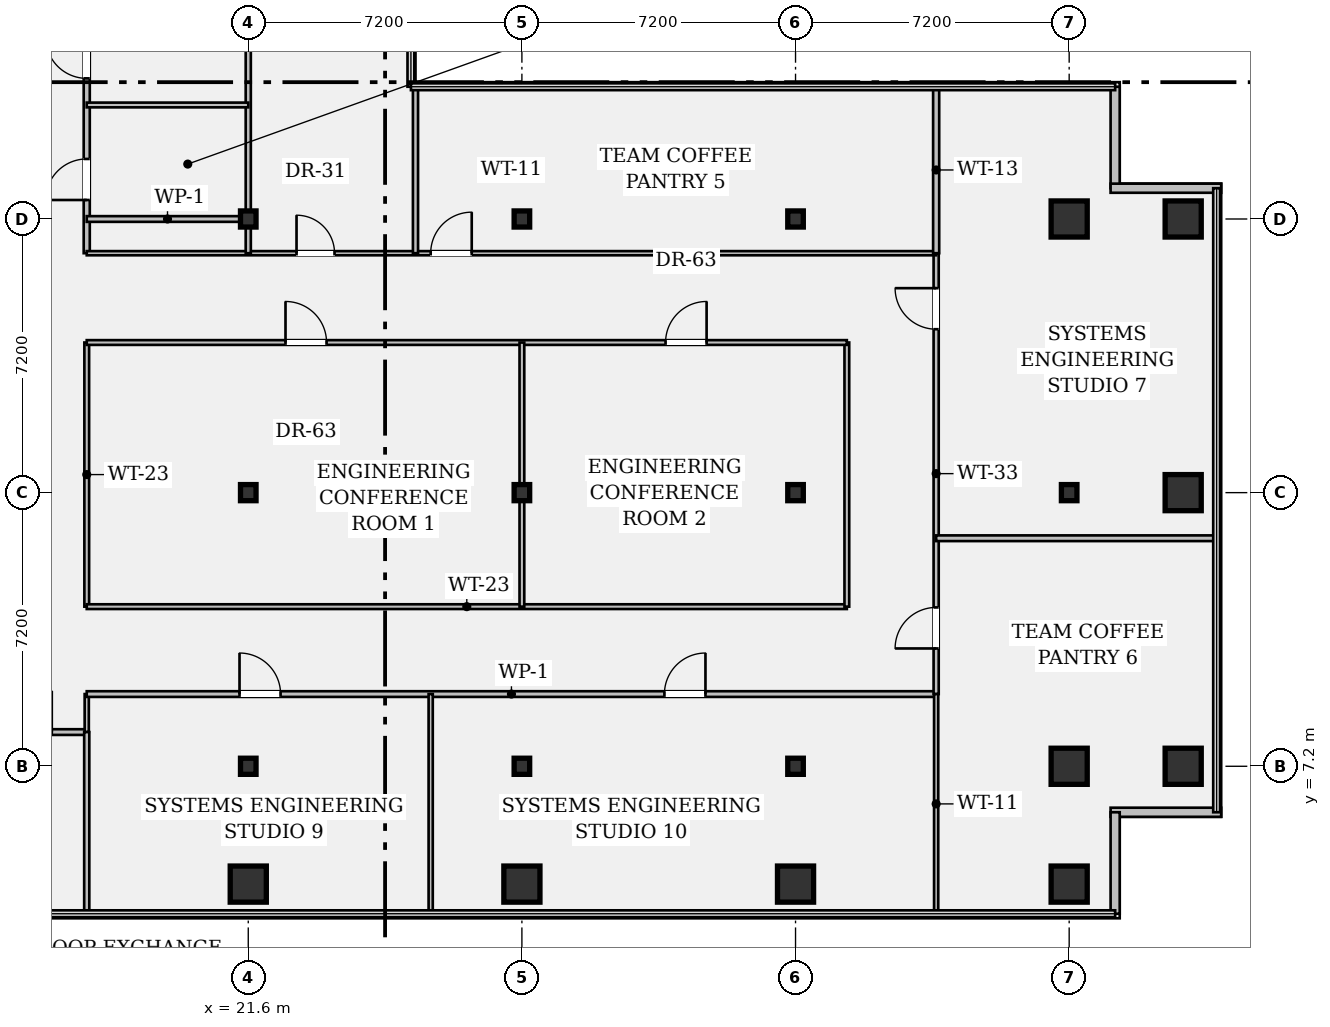
"""IFC4 building model, lengths in metres.
Left out: names, types, materials, properties, quantities, classifications, styles, units other than length and angle.
Written with IfcOpenShell. Run it as: python <this file> out.ifc"""

import sys

from ifc_helpers import new_model, si_unit, direction, frame, frame_2d, origin, origin_2d, place, context, subcontext, project, spatial, rectangle, hollow_rectangle, i_section, extrude, element, fill, save


model = new_model("IFC4")
c1 = context("Model", 3, precision=1e-05, world=origin(), true_north=direction((0.0, 1.0)))
c2 = subcontext(c1, "Body", "Model", "MODEL_VIEW")
j1 = project(units=[si_unit("LENGTHUNIT", "METRE"), si_unit("PLANEANGLEUNIT", "RADIAN")], contexts=[c1])
p1 = place(None, origin())
s1 = spatial("IfcSite", under=j1, at=p1, CompositionType="ELEMENT")
p2 = place(p1, origin())
s2 = spatial("IfcBuilding", under=s1, at=p2, CompositionType="ELEMENT")
p3 = place(p2, frame((0.0, 0.0, 102.2)))
s3 = spatial("IfcBuildingStorey", under=s2, at=p3, CompositionType="ELEMENT", Elevation=102.2)
p4 = place(p3, frame((21.6, 4.1, 0.0), z_axis=(0.0, 0.0, 1.0), x_axis=(1.0, 0.0, 0.0)))
e1 = element("IfcColumn", 1, at=p4, inside=s3, PredefinedType="COLUMN", context=c2, shape_type="SweptSolid", body=[
    extrude(hollow_rectangle(XDim=0.95, YDim=0.95, WallThickness=0.06, at=origin_2d()), origin(), (0.0, 0.0, 1.0), 3.58),
])
for number, where, z_axis, x_axis in (
    (2, (21.6, 7.2, 0.0), (0.0, 0.0, 1.0), (1.0, 0.0, 0.0)),
    (3, (21.6, 14.4, 0.0), (0.0, 0.0, 1.0), (1.0, 0.0, 0.0)),
    (4, (21.6, 21.6, 0.0), (0.0, 0.0, 1.0), (1.0, 0.0, 0.0)),
):
    element("IfcColumn", number, at=place(p3, frame(where, z_axis=z_axis, x_axis=x_axis)), inside=s3, PredefinedType="COLUMN", context=c2, shape_type="SweptSolid", body=[
        extrude(i_section(OverallWidth=0.409, OverallDepth=0.424, WebThickness=0.033, FlangeThickness=0.052, FilletRadius=0.018, at=origin_2d()), origin(), (0.0, 0.0, 1.0), 3.58),
    ])
p5 = place(p3, frame((28.8, 4.1, 0.0), z_axis=(0.0, 0.0, 1.0), x_axis=(1.0, 0.0, 0.0)))
e5 = element("IfcColumn", 5, at=p5, inside=s3, PredefinedType="COLUMN", context=c2, shape_type="SweptSolid", body=[
    extrude(hollow_rectangle(XDim=0.95, YDim=0.95, WallThickness=0.06, at=origin_2d()), origin(), (0.0, 0.0, 1.0), 3.58),
])
for number, where, z_axis, x_axis in (
    (6, (28.8, 7.2, 0.0), (0.0, 0.0, 1.0), (1.0, 0.0, 0.0)),
    (7, (28.8, 14.4, 0.0), (0.0, 0.0, 1.0), (1.0, 0.0, 0.0)),
    (8, (28.8, 21.6, 0.0), (0.0, 0.0, 1.0), (1.0, 0.0, 0.0)),
):
    element("IfcColumn", number, at=place(p3, frame(where, z_axis=z_axis, x_axis=x_axis)), inside=s3, PredefinedType="COLUMN", context=c2, shape_type="SweptSolid", body=[
        extrude(i_section(OverallWidth=0.409, OverallDepth=0.424, WebThickness=0.033, FlangeThickness=0.052, FilletRadius=0.018, at=origin_2d()), origin(), (0.0, 0.0, 1.0), 3.58),
    ])
p6 = place(p3, frame((36.0, 4.1, 0.0), z_axis=(0.0, 0.0, 1.0), x_axis=(1.0, 0.0, 0.0)))
e9 = element("IfcColumn", 9, at=p6, inside=s3, PredefinedType="COLUMN", context=c2, shape_type="SweptSolid", body=[
    extrude(hollow_rectangle(XDim=0.95, YDim=0.95, WallThickness=0.06, at=origin_2d()), origin(), (0.0, 0.0, 1.0), 3.58),
])
for number, where, z_axis, x_axis in (
    (10, (36.0, 7.2, 0.0), (0.0, 0.0, 1.0), (1.0, 0.0, 0.0)),
    (11, (36.0, 14.4, 0.0), (0.0, 0.0, 1.0), (1.0, 0.0, 0.0)),
    (12, (36.0, 21.6, 0.0), (0.0, 0.0, 1.0), (1.0, 0.0, 0.0)),
):
    element("IfcColumn", number, at=place(p3, frame(where, z_axis=z_axis, x_axis=x_axis)), inside=s3, PredefinedType="COLUMN", context=c2, shape_type="SweptSolid", body=[
        extrude(i_section(OverallWidth=0.409, OverallDepth=0.424, WebThickness=0.033, FlangeThickness=0.052, FilletRadius=0.018, at=origin_2d()), origin(), (0.0, 0.0, 1.0), 3.58),
    ])
for number, where, z_axis, x_axis in (
    (13, (43.2, 4.1, 0.0), (0.0, 0.0, 1.0), (1.0, 0.0, 0.0)),
    (14, (43.2, 7.2, 0.0), (0.0, 0.0, 1.0), (1.0, 0.0, 0.0)),
):
    element("IfcColumn", number, at=place(p3, frame(where, z_axis=z_axis, x_axis=x_axis)), inside=s3, PredefinedType="COLUMN", context=c2, shape_type="SweptSolid", body=[
        extrude(hollow_rectangle(XDim=0.95, YDim=0.95, WallThickness=0.06, at=origin_2d()), origin(), (0.0, 0.0, 1.0), 3.58),
    ])
p7 = place(p3, frame((43.2, 14.4, 0.0), z_axis=(0.0, 0.0, 1.0), x_axis=(1.0, 0.0, 0.0)))
e15 = element("IfcColumn", 15, at=p7, inside=s3, PredefinedType="COLUMN", context=c2, shape_type="SweptSolid", body=[
    extrude(i_section(OverallWidth=0.409, OverallDepth=0.424, WebThickness=0.033, FlangeThickness=0.052, FilletRadius=0.018, at=origin_2d()), origin(), (0.0, 0.0, 1.0), 3.58),
])
for number, where, z_axis, x_axis in (
    (16, (43.2, 21.6, 0.0), (0.0, 0.0, 1.0), (1.0, 0.0, 0.0)),
    (17, (46.2, 7.2, 0.0), (0.0, 0.0, 1.0), (1.0, 0.0, 0.0)),
    (18, (46.2, 14.4, 0.0), (0.0, 0.0, 1.0), (1.0, 0.0, 0.0)),
    (19, (46.2, 21.6, 0.0), (0.0, 0.0, 1.0), (1.0, 0.0, 0.0)),
):
    element("IfcColumn", number, at=place(p3, frame(where, z_axis=z_axis, x_axis=x_axis)), inside=s3, PredefinedType="COLUMN", context=c2, shape_type="SweptSolid", body=[
        extrude(hollow_rectangle(XDim=0.95, YDim=0.95, WallThickness=0.06, at=origin_2d()), origin(), (0.0, 0.0, 1.0), 3.58),
    ])
p8 = place(p3, frame((44.41, 25.08, 0.0), z_axis=(0.0, 0.0, 1.0), x_axis=(0.0, -1.0, 0.0)))
e20 = element("IfcWall", 20, at=p8, inside=s3, PredefinedType="STANDARD", context=c2, shape_type="SweptSolid", body=[
    extrude(rectangle(XDim=2.67, YDim=0.24, at=frame_2d((1.335, 0.0))), origin(), (0.0, 0.0, 1.0), 3.58),
])
for number, where, z_axis, x_axis in (
    (21, (44.29, 22.41, 0.0), (0.0, 0.0, 1.0), (1.0, 0.0, 0.0)),
    (22, (47.2, 5.99, 0.0), (0.0, 0.0, 1.0), (-1.0, 0.0, 0.0)),
):
    element("IfcWall", number, at=place(p3, frame(where, z_axis=z_axis, x_axis=x_axis)), inside=s3, PredefinedType="STANDARD", context=c2, shape_type="SweptSolid", body=[
        extrude(rectangle(XDim=2.91, YDim=0.24, at=frame_2d((1.455, 0.0))), origin(), (0.0, 0.0, 1.0), 3.58),
    ])
p9 = place(p3, frame((44.41, 5.99, 0.0), z_axis=(0.0, 0.0, 1.0), x_axis=(0.0, -1.0, 0.0)))
e23 = element("IfcWall", 23, at=p9, inside=s3, PredefinedType="STANDARD", context=c2, shape_type="SweptSolid", body=[
    extrude(rectangle(XDim=2.67, YDim=0.24, at=frame_2d((1.335, 0.0))), origin(), (0.0, 0.0, 1.0), 3.58),
])
p10 = place(p3, frame((14.4, 8.1, 0.0), z_axis=(0.0, 0.0, 1.0), x_axis=(1.0, 0.0, 0.0)))
e24 = element("IfcWall", 24, at=p10, inside=s3, PredefinedType="PARTITIONING", context=c2, shape_type="SweptSolid", body=[
    extrude(rectangle(XDim=2.95, YDim=0.15, at=frame_2d((1.475, 0.0))), origin(), (0.0, 0.0, 1.0), 3.098),
])
p11 = place(p10, frame((0.95, 0.0, 0.0)))
e25 = element("IfcOpeningElement", 25, at=p11, cuts=e24, PredefinedType="OPENING", context=c2, shape_type="SweptSolid", body=[
    extrude(rectangle(XDim=1.08, YDim=2.15, at=frame_2d((0.54, 1.075))), frame((0.0, 0.087, 0.0), z_axis=(0.0, -1.0, 0.0), x_axis=(1.0, 0.0, 0.0)), (0.0, 0.0, 1.0), 0.174),
])
p12 = place(p3, frame((17.35, 8.1, 0.0), z_axis=(0.0, 0.0, 1.0), x_axis=(0.0, 1.0, 0.0)))
e26 = element("IfcWall", 26, at=p12, inside=s3, PredefinedType="PARTITIONING", context=c2, shape_type="SweptSolid", body=[
    extrude(rectangle(XDim=1.0, YDim=0.11, at=frame_2d((0.5, 0.0))), origin(), (0.0, 0.0, 1.0), 3.58),
])
p13 = place(p3, frame((17.35, 20.7, 0.0), z_axis=(0.0, 0.0, 1.0), x_axis=(0.0, 1.0, 0.0)))
e27 = element("IfcWall", 27, at=p13, inside=s3, PredefinedType="PARTITIONING", context=c2, shape_type="SweptSolid", body=[
    extrude(rectangle(XDim=15.2, YDim=0.16, at=frame_2d((7.6, 0.0))), origin(), (0.0, 0.0, 1.0), 2.793),
])
p14 = place(p13, frame((1.4, 0.0, 0.0)))
e28 = element("IfcOpeningElement", 28, at=p14, cuts=e27, PredefinedType="OPENING", context=c2, shape_type="SweptSolid", body=[
    extrude(rectangle(XDim=1.08, YDim=2.15, at=frame_2d((0.54, 1.075))), frame((0.0, 0.092, 0.0), z_axis=(0.0, -1.0, 0.0), x_axis=(1.0, 0.0, 0.0)), (0.0, 0.0, 1.0), 0.184),
])
p15 = place(p13, frame((4.6, 0.0, 0.0)))
e29 = element("IfcOpeningElement", 29, at=p15, cuts=e27, PredefinedType="OPENING", context=c2, shape_type="SweptSolid", body=[
    extrude(rectangle(XDim=1.08, YDim=2.15, at=frame_2d((0.54, 1.075))), frame((0.0, 0.092, 0.0), z_axis=(0.0, -1.0, 0.0), x_axis=(1.0, 0.0, 0.0)), (0.0, 0.0, 1.0), 0.184),
])
p16 = place(p13, frame((8.0, 0.0, 0.0)))
e30 = element("IfcOpeningElement", 30, at=p16, cuts=e27, PredefinedType="OPENING", context=c2, shape_type="SweptSolid", body=[
    extrude(rectangle(XDim=1.08, YDim=2.15, at=frame_2d((0.54, 1.075))), frame((0.0, 0.092, 0.0), z_axis=(0.0, -1.0, 0.0), x_axis=(1.0, 0.0, 0.0)), (0.0, 0.0, 1.0), 0.184),
])
p17 = place(p13, frame((11.5, 0.0, 0.0)))
e31 = element("IfcOpeningElement", 31, at=p17, cuts=e27, PredefinedType="OPENING", context=c2, shape_type="SweptSolid", body=[
    extrude(rectangle(XDim=1.08, YDim=2.15, at=frame_2d((0.54, 1.075))), frame((0.0, 0.092, 0.0), z_axis=(0.0, -1.0, 0.0), x_axis=(1.0, 0.0, 0.0)), (0.0, 0.0, 1.0), 0.184),
])
p18 = place(p3, frame((17.35, 9.1, 0.0), z_axis=(0.0, 0.0, 1.0), x_axis=(1.0, 0.0, 0.0)))
e32 = element("IfcWall", 32, at=p18, inside=s3, PredefinedType="PARTITIONING", context=c2, shape_type="SweptSolid", body=[
    extrude(rectangle(XDim=22.35, YDim=0.15, at=frame_2d((11.175, 0.0))), origin(), (0.0, 0.0, 1.0), 2.793),
])
p19 = place(p18, frame((4.02, 0.0, 0.0)))
e33 = element("IfcOpeningElement", 33, at=p19, cuts=e32, PredefinedType="OPENING", context=c2, shape_type="SweptSolid", body=[
    extrude(rectangle(XDim=1.08, YDim=2.15, at=frame_2d((0.54, 1.075))), frame((0.0, 0.087, 0.0), z_axis=(0.0, -1.0, 0.0), x_axis=(1.0, 0.0, 0.0)), (0.0, 0.0, 1.0), 0.174),
])
p20 = place(p18, frame((15.2, 0.0, 0.0)))
e34 = element("IfcOpeningElement", 34, at=p20, cuts=e32, PredefinedType="OPENING", context=c2, shape_type="SweptSolid", body=[
    extrude(rectangle(XDim=1.08, YDim=2.15, at=frame_2d((0.54, 1.075))), frame((0.0, 0.087, 0.0), z_axis=(0.0, -1.0, 0.0), x_axis=(1.0, 0.0, 0.0)), (0.0, 0.0, 1.0), 0.174),
])
p21 = place(p3, frame((39.7, 9.1, 0.0), z_axis=(0.0, 0.0, 1.0), x_axis=(0.0, 1.0, 0.0)))
e35 = element("IfcWall", 35, at=p21, inside=s3, PredefinedType="PARTITIONING", context=c2, shape_type="SweptSolid", body=[
    extrude(rectangle(XDim=11.6, YDim=0.135, at=frame_2d((5.8, 0.0))), origin(), (0.0, 0.0, 1.0), 2.793),
])
p22 = place(p21, frame((1.2, 0.0, 0.0)))
e36 = element("IfcOpeningElement", 36, at=p22, cuts=e35, PredefinedType="OPENING", context=c2, shape_type="SweptSolid", body=[
    extrude(rectangle(XDim=1.08, YDim=2.15, at=frame_2d((0.54, 1.075))), frame((0.0, 0.08, 0.0), z_axis=(0.0, -1.0, 0.0), x_axis=(1.0, 0.0, 0.0)), (0.0, 0.0, 1.0), 0.159),
])
p23 = place(p21, frame((9.6, 0.0, 0.0)))
e37 = element("IfcOpeningElement", 37, at=p23, cuts=e35, PredefinedType="OPENING", context=c2, shape_type="SweptSolid", body=[
    extrude(rectangle(XDim=1.08, YDim=2.15, at=frame_2d((0.54, 1.075))), frame((0.0, 0.08, 0.0), z_axis=(0.0, -1.0, 0.0), x_axis=(1.0, 0.0, 0.0)), (0.0, 0.0, 1.0), 0.159),
])
p24 = place(p3, frame((17.35, 20.7, 0.0), z_axis=(0.0, 0.0, 1.0), x_axis=(1.0, 0.0, 0.0)))
e38 = element("IfcWall", 38, at=p24, inside=s3, PredefinedType="PARTITIONING", context=c2, shape_type="SweptSolid", body=[
    extrude(rectangle(XDim=22.35, YDim=0.11, at=frame_2d((11.175, 0.0))), origin(), (0.0, 0.0, 1.0), 2.793),
])
p25 = place(p24, frame((5.52, 0.0, 0.0)))
e39 = element("IfcOpeningElement", 39, at=p25, cuts=e38, PredefinedType="OPENING", context=c2, shape_type="SweptSolid", body=[
    extrude(rectangle(XDim=1.0, YDim=2.15, at=frame_2d((0.5, 1.075))), frame((0.0, 0.067, 0.0), z_axis=(0.0, -1.0, 0.0), x_axis=(1.0, 0.0, 0.0)), (0.0, 0.0, 1.0), 0.134),
])
p26 = place(p24, frame((9.05, 0.0, 0.0)))
e40 = element("IfcOpeningElement", 40, at=p26, cuts=e38, PredefinedType="OPENING", context=c2, shape_type="SweptSolid", body=[
    extrude(rectangle(XDim=1.08, YDim=2.15, at=frame_2d((0.54, 1.075))), frame((0.0, 0.067, 0.0), z_axis=(0.0, -1.0, 0.0), x_axis=(1.0, 0.0, 0.0)), (0.0, 0.0, 1.0), 0.134),
])
p27 = place(p3, frame((17.35, 11.4, 0.0), z_axis=(0.0, 0.0, 1.0), x_axis=(0.0, 1.0, 0.0)))
e41 = element("IfcWall", 41, at=p27, inside=s3, PredefinedType="PARTITIONING", context=c2, shape_type="SweptSolid", body=[
    extrude(rectangle(XDim=6.95, YDim=0.125, at=frame_2d((3.475, 0.0))), origin(), (0.0, 0.0, 1.0), 2.793),
])
p28 = place(p3, frame((17.35, 11.4, 0.0), z_axis=(0.0, 0.0, 1.0), x_axis=(1.0, 0.0, 0.0)))
e42 = element("IfcWall", 42, at=p28, inside=s3, PredefinedType="PARTITIONING", context=c2, shape_type="SweptSolid", body=[
    extrude(rectangle(XDim=20.0, YDim=0.125, at=frame_2d((10.0, 0.0))), origin(), (0.0, 0.0, 1.0), 2.793),
])
p29 = place(p3, frame((37.35, 11.4, 0.0), z_axis=(0.0, 0.0, 1.0), x_axis=(0.0, 1.0, 0.0)))
e43 = element("IfcWall", 43, at=p29, inside=s3, PredefinedType="PARTITIONING", context=c2, shape_type="SweptSolid", body=[
    extrude(rectangle(XDim=6.95, YDim=0.125, at=frame_2d((3.475, 0.0))), origin(), (0.0, 0.0, 1.0), 2.793),
])
p30 = place(p3, frame((17.35, 18.35, 0.0), z_axis=(0.0, 0.0, 1.0), x_axis=(1.0, 0.0, 0.0)))
e44 = element("IfcWall", 44, at=p30, inside=s3, PredefinedType="PARTITIONING", context=c2, shape_type="SweptSolid", body=[
    extrude(rectangle(XDim=20.0, YDim=0.125, at=frame_2d((10.0, 0.0))), origin(), (0.0, 0.0, 1.0), 2.793),
])
p31 = place(p30, frame((5.23, 0.0, 0.0)))
e45 = element("IfcOpeningElement", 45, at=p31, cuts=e44, PredefinedType="OPENING", context=c2, shape_type="SweptSolid", body=[
    extrude(rectangle(XDim=1.08, YDim=2.15, at=frame_2d((0.54, 1.075))), frame((0.0, 0.074, 0.0), z_axis=(0.0, -1.0, 0.0), x_axis=(1.0, 0.0, 0.0)), (0.0, 0.0, 1.0), 0.149),
])
p32 = place(p30, frame((15.23, 0.0, 0.0)))
e46 = element("IfcOpeningElement", 46, at=p32, cuts=e44, PredefinedType="OPENING", context=c2, shape_type="SweptSolid", body=[
    extrude(rectangle(XDim=1.08, YDim=2.15, at=frame_2d((0.54, 1.075))), frame((0.0, 0.074, 0.0), z_axis=(0.0, -1.0, 0.0), x_axis=(1.0, 0.0, 0.0)), (0.0, 0.0, 1.0), 0.149),
])
p33 = place(p3, frame((28.8, 11.4, 0.0), z_axis=(0.0, 0.0, 1.0), x_axis=(0.0, 1.0, 0.0)))
e47 = element("IfcWall", 47, at=p33, inside=s3, PredefinedType="PARTITIONING", context=c2, shape_type="SweptSolid", body=[
    extrude(rectangle(XDim=6.95, YDim=0.125, at=frame_2d((3.475, 0.0))), origin(), (0.0, 0.0, 1.0), 2.793),
])
p34 = place(p3, frame((17.35, 21.6, 0.0), z_axis=(0.0, 0.0, 1.0), x_axis=(1.0, 0.0, 0.0)))
e48 = element("IfcWall", 48, at=p34, inside=s3, PredefinedType="PARTITIONING", context=c2, shape_type="SweptSolid", body=[
    extrude(rectangle(XDim=4.25, YDim=0.15, at=frame_2d((2.125, 0.0))), origin(), (0.0, 0.0, 1.0), 2.793),
])
p35 = place(p3, frame((21.6, 20.7, 0.0), z_axis=(0.0, 0.0, 1.0), x_axis=(0.0, 1.0, 0.0)))
e49 = element("IfcWall", 49, at=p35, inside=s3, PredefinedType="PARTITIONING", context=c2, shape_type="SweptSolid", body=[
    extrude(rectangle(XDim=22.38, YDim=0.135, at=frame_2d((11.19, 0.0))), origin(), (0.0, 0.0, 1.0), 2.793),
])
p36 = place(p3, frame((17.35, 24.6, 0.0), z_axis=(0.0, 0.0, 1.0), x_axis=(1.0, 0.0, 0.0)))
e50 = element("IfcWall", 50, at=p36, inside=s3, PredefinedType="PARTITIONING", context=c2, shape_type="SweptSolid", body=[
    extrude(rectangle(XDim=4.25, YDim=0.125, at=frame_2d((2.125, 0.0))), origin(), (0.0, 0.0, 1.0), 2.793),
])
p37 = place(p3, frame((26.0, 20.7, 0.0), z_axis=(0.0, 0.0, 1.0), x_axis=(0.0, 1.0, 0.0)))
e51 = element("IfcWall", 51, at=p37, inside=s3, PredefinedType="PARTITIONING", context=c2, shape_type="SweptSolid", body=[
    extrude(rectangle(XDim=4.38, YDim=0.135, at=frame_2d((2.19, 0.0))), origin(), (0.0, 0.0, 1.0), 2.793),
])
p38 = place(p3, frame((39.7, 3.32, 0.0), z_axis=(0.0, 0.0, 1.0), x_axis=(0.0, 1.0, 0.0)))
e52 = element("IfcWall", 52, at=p38, inside=s3, PredefinedType="PARTITIONING", context=c2, shape_type="SweptSolid", body=[
    extrude(rectangle(XDim=5.78, YDim=0.11, at=frame_2d((2.89, 0.0))), origin(), (0.0, 0.0, 1.0), 2.793),
])
p39 = place(p3, frame((39.7, 20.7, 0.0), z_axis=(0.0, 0.0, 1.0), x_axis=(0.0, 1.0, 0.0)))
e53 = element("IfcWall", 53, at=p39, inside=s3, PredefinedType="PARTITIONING", context=c2, shape_type="SweptSolid", body=[
    extrude(rectangle(XDim=4.38, YDim=0.16, at=frame_2d((2.19, 0.0))), origin(), (0.0, 0.0, 1.0), 2.793),
])
p40 = place(p3, frame((39.7, 13.2, 0.0), z_axis=(0.0, 0.0, 1.0), x_axis=(1.0, 0.0, 0.0)))
e54 = element("IfcWall", 54, at=p40, inside=s3, PredefinedType="PARTITIONING", context=c2, shape_type="SweptSolid", body=[
    extrude(rectangle(XDim=7.38, YDim=0.15, at=frame_2d((3.69, 0.0))), origin(), (0.0, 0.0, 1.0), 2.793),
])
p41 = place(p3, frame((17.35, 3.32, 0.0), z_axis=(0.0, 0.0, 1.0), x_axis=(0.0, 1.0, 0.0)))
e55 = element("IfcWall", 55, at=p41, inside=s3, PredefinedType="PARTITIONING", context=c2, shape_type="SweptSolid", body=[
    extrude(rectangle(XDim=4.78, YDim=0.135, at=frame_2d((2.39, 0.0))), origin(), (0.0, 0.0, 1.0), 2.793),
])
p42 = place(p3, frame((26.4, 3.32, 0.0), z_axis=(0.0, 0.0, 1.0), x_axis=(0.0, 1.0, 0.0)))
e56 = element("IfcWall", 56, at=p42, inside=s3, PredefinedType="PARTITIONING", context=c2, shape_type="SweptSolid", body=[
    extrude(rectangle(XDim=5.78, YDim=0.11, at=frame_2d((2.89, 0.0))), origin(), (0.0, 0.0, 1.0), 2.793),
])
p43 = place(p31, origin())
e57 = element("IfcDoor", 57, at=p43, inside=s3, OperationType="SINGLE_SWING_LEFT", PredefinedType="DOOR", context=c2, shape_type="SweptSolid", body=[
    extrude(rectangle(XDim=1.08, YDim=2.15, at=frame_2d((0.54, 1.075))), frame((0.0, 0.025, 0.0), z_axis=(0.0, -1.0, 0.0), x_axis=(1.0, 0.0, 0.0)), (0.0, 0.0, 1.0), 0.05),
])
fill(e45, e57)
p44 = place(p32, origin())
e58 = element("IfcDoor", 58, at=p44, inside=s3, OperationType="SINGLE_SWING_RIGHT", PredefinedType="DOOR", context=c2, shape_type="SweptSolid", body=[
    extrude(rectangle(XDim=1.08, YDim=2.15, at=frame_2d((0.54, 1.075))), frame((0.0, 0.025, 0.0), z_axis=(0.0, -1.0, 0.0), x_axis=(1.0, 0.0, 0.0)), (0.0, 0.0, 1.0), 0.05),
])
fill(e46, e58)
p45 = place(p14, origin())
e59 = element("IfcDoor", 59, at=p45, inside=s3, OperationType="SINGLE_SWING_LEFT", PredefinedType="DOOR", context=c2, shape_type="SweptSolid", body=[
    extrude(rectangle(XDim=1.08, YDim=2.15, at=frame_2d((0.54, 1.075))), frame((0.0, 0.025, 0.0), z_axis=(0.0, -1.0, 0.0), x_axis=(1.0, 0.0, 0.0)), (0.0, 0.0, 1.0), 0.05),
])
fill(e28, e59)
p46 = place(p15, origin())
e60 = element("IfcDoor", 60, at=p46, inside=s3, OperationType="SINGLE_SWING_RIGHT", PredefinedType="DOOR", context=c2, shape_type="SweptSolid", body=[
    extrude(rectangle(XDim=1.08, YDim=2.15, at=frame_2d((0.54, 1.075))), frame((0.0, 0.025, 0.0), z_axis=(0.0, -1.0, 0.0), x_axis=(1.0, 0.0, 0.0)), (0.0, 0.0, 1.0), 0.05),
])
fill(e29, e60)
p47 = place(p25, origin())
e61 = element("IfcDoor", 61, at=p47, inside=s3, OperationType="SINGLE_SWING_LEFT", PredefinedType="DOOR", context=c2, shape_type="SweptSolid", body=[
    extrude(rectangle(XDim=1.0, YDim=2.15, at=frame_2d((0.5, 1.075))), frame((0.0, 0.025, 0.0), z_axis=(0.0, -1.0, 0.0), x_axis=(1.0, 0.0, 0.0)), (0.0, 0.0, 1.0), 0.05),
])
fill(e39, e61)
p48 = place(p26, origin())
e62 = element("IfcDoor", 62, at=p48, inside=s3, OperationType="SINGLE_SWING_RIGHT", PredefinedType="DOOR", context=c2, shape_type="SweptSolid", body=[
    extrude(rectangle(XDim=1.08, YDim=2.15, at=frame_2d((0.54, 1.075))), frame((0.0, 0.025, 0.0), z_axis=(0.0, -1.0, 0.0), x_axis=(1.0, 0.0, 0.0)), (0.0, 0.0, 1.0), 0.05),
])
fill(e40, e62)
p49 = place(p22, origin())
e63 = element("IfcDoor", 63, at=p49, inside=s3, OperationType="SINGLE_SWING_LEFT", PredefinedType="DOOR", context=c2, shape_type="SweptSolid", body=[
    extrude(rectangle(XDim=1.08, YDim=2.15, at=frame_2d((0.54, 1.075))), frame((0.0, 0.025, 0.0), z_axis=(0.0, -1.0, 0.0), x_axis=(1.0, 0.0, 0.0)), (0.0, 0.0, 1.0), 0.05),
])
fill(e36, e63)
p50 = place(p23, origin())
e64 = element("IfcDoor", 64, at=p50, inside=s3, OperationType="SINGLE_SWING_RIGHT", PredefinedType="DOOR", context=c2, shape_type="SweptSolid", body=[
    extrude(rectangle(XDim=1.08, YDim=2.15, at=frame_2d((0.54, 1.075))), frame((0.0, 0.025, 0.0), z_axis=(0.0, -1.0, 0.0), x_axis=(1.0, 0.0, 0.0)), (0.0, 0.0, 1.0), 0.05),
])
fill(e37, e64)
p51 = place(p19, origin())
e65 = element("IfcDoor", 65, at=p51, inside=s3, OperationType="SINGLE_SWING_LEFT", PredefinedType="DOOR", context=c2, shape_type="SweptSolid", body=[
    extrude(rectangle(XDim=1.08, YDim=2.15, at=frame_2d((0.54, 1.075))), frame((0.0, 0.025, 0.0), z_axis=(0.0, -1.0, 0.0), x_axis=(1.0, 0.0, 0.0)), (0.0, 0.0, 1.0), 0.05),
])
fill(e33, e65)
p52 = place(p20, origin())
e66 = element("IfcDoor", 66, at=p52, inside=s3, OperationType="SINGLE_SWING_RIGHT", PredefinedType="DOOR", context=c2, shape_type="SweptSolid", body=[
    extrude(rectangle(XDim=1.08, YDim=2.15, at=frame_2d((0.54, 1.075))), frame((0.0, 0.025, 0.0), z_axis=(0.0, -1.0, 0.0), x_axis=(1.0, 0.0, 0.0)), (0.0, 0.0, 1.0), 0.05),
])
fill(e34, e66)
save(model, sys.argv[1])
